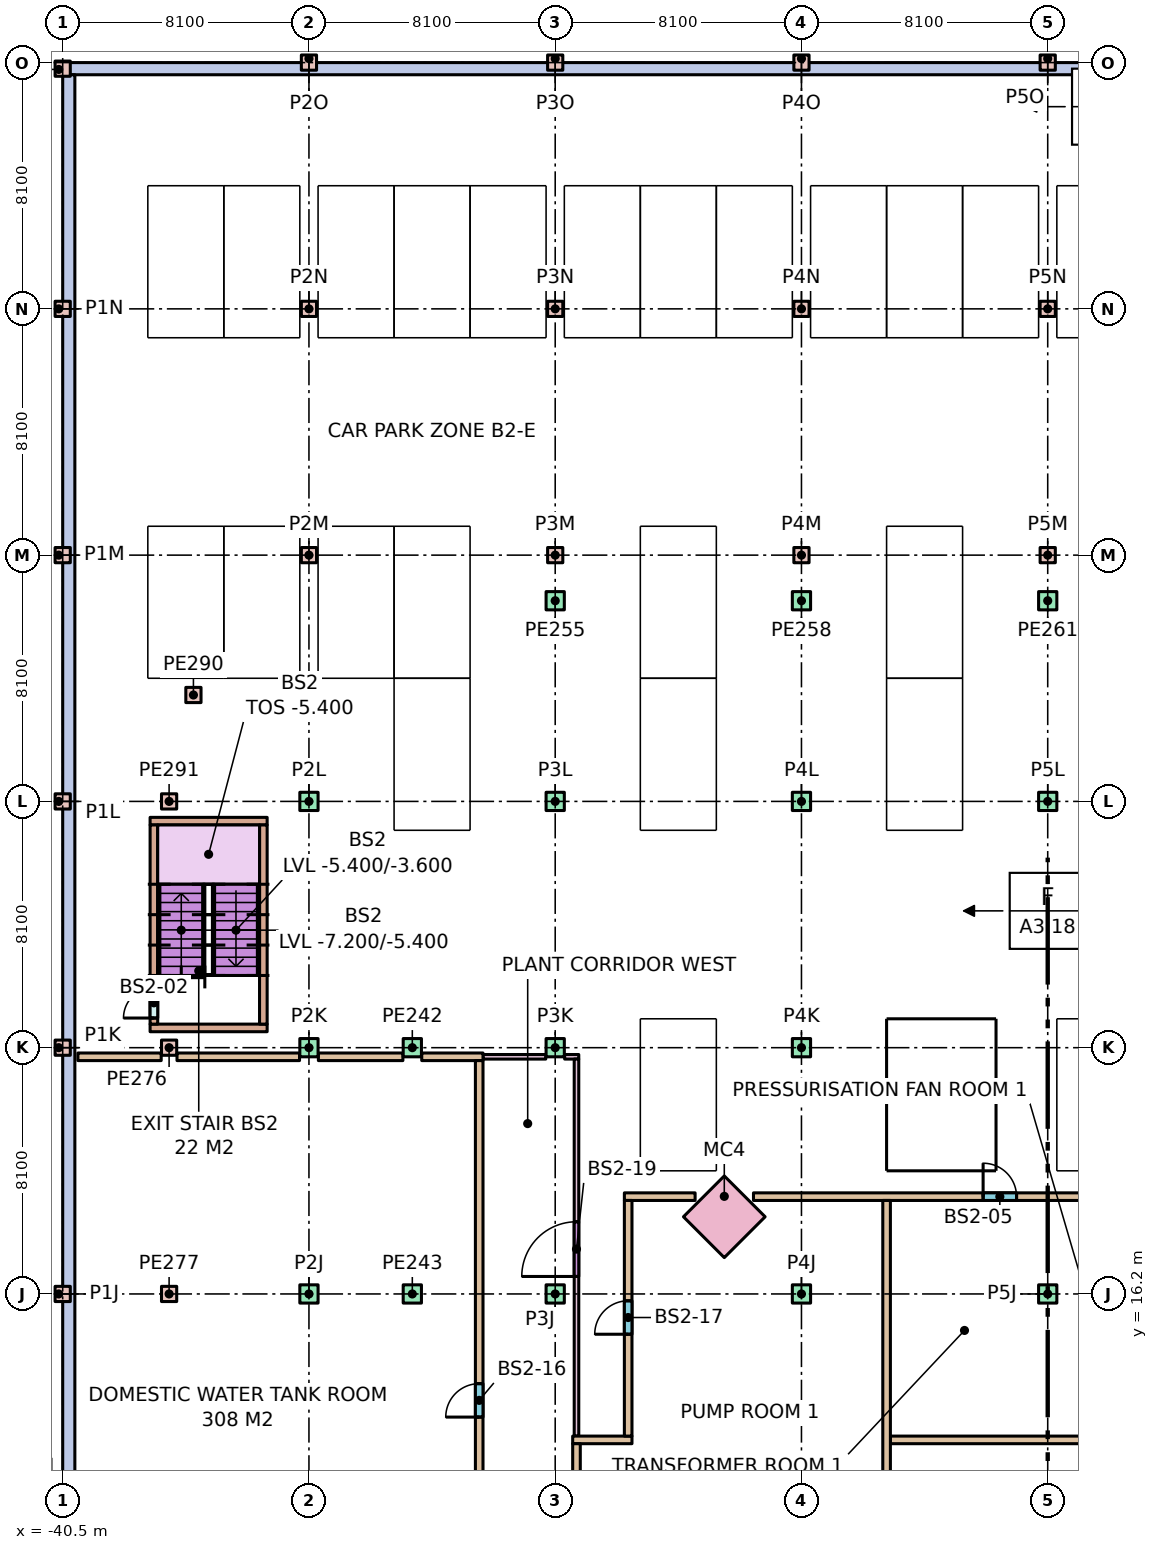
"""IFC4 building model, lengths in metres.
Left out: names, types, materials, properties, quantities, classifications, styles, units other than length and angle.
Written with IfcOpenShell. Run it as: python <this file> out.ifc"""

import sys

from ifc_helpers import new_model, si_unit, direction, frame, frame_2d, origin, origin_2d, place, context, subcontext, project, spatial, rectangle, extrude, element, fill, save


model = new_model("IFC4")
c1 = context("Model", 3, precision=1e-05, world=origin(), true_north=direction((0.0, 1.0)))
c2 = subcontext(c1, "Body", "Model", "MODEL_VIEW")
j1 = project(units=[si_unit("LENGTHUNIT", "METRE"), si_unit("PLANEANGLEUNIT", "RADIAN")], contexts=[c1])
p1 = place(None, origin())
s1 = spatial("IfcSite", under=j1, at=p1, CompositionType="ELEMENT")
p2 = place(p1, origin())
s2 = spatial("IfcBuilding", under=s1, at=p2, CompositionType="ELEMENT")
p3 = place(p2, frame((0.0, 0.0, -7.2)))
s3 = spatial("IfcBuildingStorey", under=s2, at=p3, CompositionType="ELEMENT", Elevation=-7.2)
p4 = place(p3, frame((-40.5, 56.5, 0.0), z_axis=(0.0, 0.0, 1.0), x_axis=(1.0, 0.0, 0.0)))
e1 = element("IfcWall", 1, at=p4, inside=s3, PredefinedType="SOLIDWALL", context=c2, shape_type="SweptSolid", body=[
    extrude(rectangle(XDim=129.6, YDim=0.4, at=frame_2d((64.8, 0.0))), origin(), (0.0, 0.0, 1.0), 3.6),
])
p5 = place(p3, frame((-40.3, -56.3, 0.0), z_axis=(0.0, 0.0, 1.0), x_axis=(0.0, 1.0, 0.0)))
e2 = element("IfcWall", 2, at=p5, inside=s3, PredefinedType="SOLIDWALL", context=c2, shape_type="SweptSolid", body=[
    extrude(rectangle(XDim=112.6, YDim=0.4, at=frame_2d((56.3, 0.0))), origin(), (0.0, 0.0, 1.0), 3.6),
])
for number, where, z_axis, x_axis in (
    (3, (-40.5, 16.2, 0.0), (0.0, 0.0, 1.0), (1.0, 0.0, 0.0)),
    (4, (-40.5, 24.3, 0.0), (0.0, 0.0, 1.0), (1.0, 0.0, 0.0)),
    (5, (-40.5, 32.4, 0.0), (0.0, 0.0, 1.0), (1.0, 0.0, 0.0)),
    (6, (-40.5, 40.5, 0.0), (0.0, 0.0, 1.0), (1.0, 0.0, 0.0)),
    (7, (-40.5, 48.6, 0.0), (0.0, 0.0, 1.0), (1.0, 0.0, 0.0)),
    (8, (-40.5, 56.5, 0.0), (0.0, 0.0, 1.0), (1.0, 0.0, 0.0)),
):
    element("IfcColumn", number, at=place(p3, frame(where, z_axis=z_axis, x_axis=x_axis)), inside=s3, PredefinedType="COLUMN", context=c2, shape_type="SweptSolid", body=[
        extrude(rectangle(XDim=0.5, YDim=0.5, at=origin_2d()), origin(), (0.0, 0.0, 1.0), 3.6),
    ])
for number, where, z_axis, x_axis in (
    (9, (-32.4, 16.2, 0.0), (0.0, 0.0, 1.0), (1.0, 0.0, 0.0)),
    (10, (-32.4, 24.3, 0.0), (0.0, 0.0, 1.0), (1.0, 0.0, 0.0)),
    (11, (-32.4, 32.4, 0.0), (0.0, 0.0, 1.0), (1.0, 0.0, 0.0)),
):
    element("IfcColumn", number, at=place(p3, frame(where, z_axis=z_axis, x_axis=x_axis)), inside=s3, PredefinedType="COLUMN", context=c2, shape_type="SweptSolid", body=[
        extrude(rectangle(XDim=0.6, YDim=0.6, at=origin_2d()), origin(), (0.0, 0.0, 1.0), 3.6),
    ])
for number, where, z_axis, x_axis in (
    (12, (-32.4, 40.5, 0.0), (0.0, 0.0, 1.0), (1.0, 0.0, 0.0)),
    (13, (-32.4, 48.6, 0.0), (0.0, 0.0, 1.0), (1.0, 0.0, 0.0)),
    (14, (-32.4, 56.7, 0.0), (0.0, 0.0, 1.0), (1.0, 0.0, 0.0)),
):
    element("IfcColumn", number, at=place(p3, frame(where, z_axis=z_axis, x_axis=x_axis)), inside=s3, PredefinedType="COLUMN", context=c2, shape_type="SweptSolid", body=[
        extrude(rectangle(XDim=0.5, YDim=0.5, at=origin_2d()), origin(), (0.0, 0.0, 1.0), 3.6),
    ])
for number, where, z_axis, x_axis in (
    (15, (-24.3, 16.2, 0.0), (0.0, 0.0, 1.0), (1.0, 0.0, 0.0)),
    (16, (-24.3, 24.3, 0.0), (0.0, 0.0, 1.0), (1.0, 0.0, 0.0)),
    (17, (-24.3, 32.4, 0.0), (0.0, 0.0, 1.0), (1.0, 0.0, 0.0)),
):
    element("IfcColumn", number, at=place(p3, frame(where, z_axis=z_axis, x_axis=x_axis)), inside=s3, PredefinedType="COLUMN", context=c2, shape_type="SweptSolid", body=[
        extrude(rectangle(XDim=0.6, YDim=0.6, at=origin_2d()), origin(), (0.0, 0.0, 1.0), 3.6),
    ])
for number, where, z_axis, x_axis in (
    (18, (-24.3, 40.5, 0.0), (0.0, 0.0, 1.0), (1.0, 0.0, 0.0)),
    (19, (-24.3, 48.6, 0.0), (0.0, 0.0, 1.0), (1.0, 0.0, 0.0)),
    (20, (-24.3, 56.7, 0.0), (0.0, 0.0, 1.0), (1.0, 0.0, 0.0)),
):
    element("IfcColumn", number, at=place(p3, frame(where, z_axis=z_axis, x_axis=x_axis)), inside=s3, PredefinedType="COLUMN", context=c2, shape_type="SweptSolid", body=[
        extrude(rectangle(XDim=0.5, YDim=0.5, at=origin_2d()), origin(), (0.0, 0.0, 1.0), 3.6),
    ])
for number, where, z_axis, x_axis in (
    (21, (-16.2, 16.2, 0.0), (0.0, 0.0, 1.0), (1.0, 0.0, 0.0)),
    (22, (-16.2, 24.3, 0.0), (0.0, 0.0, 1.0), (1.0, 0.0, 0.0)),
    (23, (-16.2, 32.4, 0.0), (0.0, 0.0, 1.0), (1.0, 0.0, 0.0)),
):
    element("IfcColumn", number, at=place(p3, frame(where, z_axis=z_axis, x_axis=x_axis)), inside=s3, PredefinedType="COLUMN", context=c2, shape_type="SweptSolid", body=[
        extrude(rectangle(XDim=0.6, YDim=0.6, at=origin_2d()), origin(), (0.0, 0.0, 1.0), 3.6),
    ])
for number, where, z_axis, x_axis in (
    (24, (-16.2, 40.5, 0.0), (0.0, 0.0, 1.0), (1.0, 0.0, 0.0)),
    (25, (-16.2, 48.6, 0.0), (0.0, 0.0, 1.0), (1.0, 0.0, 0.0)),
    (26, (-16.2, 56.7, 0.0), (0.0, 0.0, 1.0), (1.0, 0.0, 0.0)),
):
    element("IfcColumn", number, at=place(p3, frame(where, z_axis=z_axis, x_axis=x_axis)), inside=s3, PredefinedType="COLUMN", context=c2, shape_type="SweptSolid", body=[
        extrude(rectangle(XDim=0.5, YDim=0.5, at=origin_2d()), origin(), (0.0, 0.0, 1.0), 3.6),
    ])
for number, where, z_axis, x_axis in (
    (27, (-8.1, 16.2, 0.0), (0.0, 0.0, 1.0), (1.0, 0.0, 0.0)),
    (28, (-8.1, 32.4, 0.0), (0.0, 0.0, 1.0), (1.0, 0.0, 0.0)),
):
    element("IfcColumn", number, at=place(p3, frame(where, z_axis=z_axis, x_axis=x_axis)), inside=s3, PredefinedType="COLUMN", context=c2, shape_type="SweptSolid", body=[
        extrude(rectangle(XDim=0.6, YDim=0.6, at=origin_2d()), origin(), (0.0, 0.0, 1.0), 3.6),
    ])
for number, where, z_axis, x_axis in (
    (29, (-8.1, 40.5, 0.0), (0.0, 0.0, 1.0), (1.0, 0.0, 0.0)),
    (30, (-8.1, 48.6, 0.0), (0.0, 0.0, 1.0), (1.0, 0.0, 0.0)),
    (31, (-8.1, 56.7, 0.0), (0.0, 0.0, 1.0), (1.0, 0.0, 0.0)),
):
    element("IfcColumn", number, at=place(p3, frame(where, z_axis=z_axis, x_axis=x_axis)), inside=s3, PredefinedType="COLUMN", context=c2, shape_type="SweptSolid", body=[
        extrude(rectangle(XDim=0.5, YDim=0.5, at=origin_2d()), origin(), (0.0, 0.0, 1.0), 3.6),
    ])
for number, where, z_axis, x_axis in (
    (32, (-29.0, 24.3, 0.0), (0.0, 0.0, 1.0), (1.0, 0.0, 0.0)),
    (33, (-29.0, 16.2, 0.0), (0.0, 0.0, 1.0), (1.0, 0.0, 0.0)),
    (34, (-24.3, 39.0, 0.0), (0.0, 0.0, 1.0), (1.0, 0.0, 0.0)),
    (35, (-16.2, 39.0, 0.0), (0.0, 0.0, 1.0), (1.0, 0.0, 0.0)),
    (36, (-8.1, 39.0, 0.0), (0.0, 0.0, 1.0), (1.0, 0.0, 0.0)),
):
    element("IfcColumn", number, at=place(p3, frame(where, z_axis=z_axis, x_axis=x_axis)), inside=s3, PredefinedType="COLUMN", context=c2, shape_type="SweptSolid", body=[
        extrude(rectangle(XDim=0.6, YDim=0.6, at=origin_2d()), origin(), (0.0, 0.0, 1.0), 3.6),
    ])
for number, where, z_axis, x_axis in (
    (37, (-37.0, 24.3, 0.0), (0.0, 0.0, 1.0), (1.0, 0.0, 0.0)),
    (38, (-37.0, 16.2, 0.0), (0.0, 0.0, 1.0), (1.0, 0.0, 0.0)),
    (39, (-36.2, 35.9, 0.0), (0.0, 0.0, 1.0), (1.0, 0.0, 0.0)),
    (40, (-37.0, 32.4, 0.0), (0.0, 0.0, 1.0), (1.0, 0.0, 0.0)),
):
    element("IfcColumn", number, at=place(p3, frame(where, z_axis=z_axis, x_axis=x_axis)), inside=s3, PredefinedType="COLUMN", context=c2, shape_type="SweptSolid", body=[
        extrude(rectangle(XDim=0.5, YDim=0.5, at=origin_2d()), origin(), (0.0, 0.0, 1.0), 3.6),
    ])
p6 = place(p3, frame((-18.738, 18.738, 0.0), z_axis=(0.0, 0.0, 1.0), x_axis=(-0.707106781187, -0.707106781187, 0.0)))
e41 = element("IfcColumn", 41, at=p6, inside=s3, PredefinedType="COLUMN", context=c2, shape_type="SweptSolid", body=[
    extrude(rectangle(XDim=1.9, YDim=1.9, at=origin_2d()), origin(), (0.0, 0.0, 1.0), 3.6),
])
for number, where, z_axis, x_axis in (
    (42, (-37.625, 24.95, 0.0), (0.0, 0.0, 1.0), (1.0, 0.0, 0.0)),
    (43, (-37.625, 31.75, 0.0), (0.0, 0.0, 1.0), (1.0, 0.0, 0.0)),
):
    element("IfcWall", number, at=place(p3, frame(where, z_axis=z_axis, x_axis=x_axis)), inside=s3, PredefinedType="STANDARD", context=c2, shape_type="SweptSolid", body=[
        extrude(rectangle(XDim=3.85, YDim=0.25, at=frame_2d((1.925, 0.0))), origin(), (0.0, 0.0, 1.0), 3.28),
    ])
p7 = place(p3, frame((-37.5, 25.075, 0.0), z_axis=(0.0, 0.0, 1.0), x_axis=(0.0, 1.0, 0.0)))
e44 = element("IfcWall", 44, at=p7, inside=s3, PredefinedType="STANDARD", context=c2, shape_type="SweptSolid", body=[
    extrude(rectangle(XDim=6.55, YDim=0.25, at=frame_2d((3.275, 0.0))), origin(), (0.0, 0.0, 1.0), 3.28),
])
p8 = place(p7, frame((0.2, 0.0, 0.0)))
e45 = element("IfcOpeningElement", 45, at=p8, cuts=e44, PredefinedType="OPENING", context=c2, shape_type="SweptSolid", body=[
    extrude(rectangle(XDim=1.0, YDim=2.1, at=frame_2d((0.5, 1.05))), frame((0.0, 0.135, 0.0), z_axis=(0.0, -1.0, 0.0), x_axis=(1.0, 0.0, 0.0)), (0.0, 0.0, 1.0), 0.27),
])
p9 = place(p3, frame((-33.9, 25.075, 0.0), z_axis=(0.0, 0.0, 1.0), x_axis=(0.0, 1.0, 0.0)))
e46 = element("IfcWall", 46, at=p9, inside=s3, PredefinedType="STANDARD", context=c2, shape_type="SweptSolid", body=[
    extrude(rectangle(XDim=6.55, YDim=0.25, at=frame_2d((3.275, 0.0))), origin(), (0.0, 0.0, 1.0), 3.28),
])
p10 = place(p3, frame((-13.275, 11.4, 0.0), z_axis=(0.0, 0.0, 1.0), x_axis=(1.0, 0.0, 0.0)))
e47 = element("IfcWall", 47, at=p10, inside=s3, PredefinedType="PARTITIONING", context=c2, shape_type="SweptSolid", body=[
    extrude(rectangle(XDim=34.55, YDim=0.25, at=frame_2d((17.275, 0.0))), origin(), (0.0, 0.0, 1.0), 3.28),
])
p11 = place(p3, frame((-26.675, 24.0, 0.0), z_axis=(0.0, 0.0, 1.0), x_axis=(1.0, 0.0, 0.0)))
e48 = element("IfcWall", 48, at=p11, inside=s3, PredefinedType="PARTITIONING", context=c2, shape_type="SweptSolid", body=[
    extrude(rectangle(XDim=2.065, YDim=0.15, at=frame_2d((1.032, 0.0))), origin(), (0.0, 0.0, 1.0), 3.28),
])
p12 = place(p3, frame((-23.99, 24.0, 0.0), z_axis=(0.0, 0.0, 1.0), x_axis=(1.0, 0.0, 0.0)))
e49 = element("IfcWall", 49, at=p12, inside=s3, PredefinedType="PARTITIONING", context=c2, shape_type="SweptSolid", body=[
    extrude(rectangle(XDim=0.465, YDim=0.15, at=frame_2d((0.232, 0.0))), origin(), (0.0, 0.0, 1.0), 3.28),
])
p13 = place(p3, frame((-23.6, 11.525, 0.0), z_axis=(0.0, 0.0, 1.0), x_axis=(0.0, 1.0, 0.0)))
e50 = element("IfcWall", 50, at=p13, inside=s3, PredefinedType="PARTITIONING", context=c2, shape_type="SweptSolid", body=[
    extrude(rectangle(XDim=12.4, YDim=0.15, at=frame_2d((6.2, 0.0))), origin(), (0.0, 0.0, 1.0), 3.28),
])
p14 = place(p13, frame((5.25, 0.0, 0.0)))
e51 = element("IfcOpeningElement", 51, at=p14, cuts=e50, PredefinedType="OPENING", context=c2, shape_type="SweptSolid", body=[
    extrude(rectangle(XDim=1.8, YDim=2.4, at=frame_2d((0.9, 1.2))), frame((0.0, 0.085, 0.0), z_axis=(0.0, -1.0, 0.0), x_axis=(1.0, 0.0, 0.0)), (0.0, 0.0, 1.0), 0.17),
])
p15 = place(p3, frame((-40.0, 24.0, 0.0), z_axis=(0.0, 0.0, 1.0), x_axis=(1.0, 0.0, 0.0)))
e52 = element("IfcWall", 52, at=p15, inside=s3, PredefinedType="PARTITIONING", context=c2, shape_type="SweptSolid", body=[
    extrude(rectangle(XDim=2.74, YDim=0.25, at=frame_2d((1.37, 0.0))), origin(), (0.0, 0.0, 1.0), 3.28),
])
p16 = place(p3, frame((-36.74, 24.0, 0.0), z_axis=(0.0, 0.0, 1.0), x_axis=(1.0, 0.0, 0.0)))
e53 = element("IfcWall", 53, at=p16, inside=s3, PredefinedType="PARTITIONING", context=c2, shape_type="SweptSolid", body=[
    extrude(rectangle(XDim=4.03, YDim=0.25, at=frame_2d((2.015, 0.0))), origin(), (0.0, 0.0, 1.0), 3.28),
])
p17 = place(p3, frame((-32.09, 24.0, 0.0), z_axis=(0.0, 0.0, 1.0), x_axis=(1.0, 0.0, 0.0)))
e54 = element("IfcWall", 54, at=p17, inside=s3, PredefinedType="PARTITIONING", context=c2, shape_type="SweptSolid", body=[
    extrude(rectangle(XDim=2.78, YDim=0.25, at=frame_2d((1.39, 0.0))), origin(), (0.0, 0.0, 1.0), 3.28),
])
p18 = place(p3, frame((-28.69, 24.0, 0.0), z_axis=(0.0, 0.0, 1.0), x_axis=(1.0, 0.0, 0.0)))
e55 = element("IfcWall", 55, at=p18, inside=s3, PredefinedType="PARTITIONING", context=c2, shape_type="SweptSolid", body=[
    extrude(rectangle(XDim=2.015, YDim=0.25, at=frame_2d((1.007, 0.0))), origin(), (0.0, 0.0, 1.0), 3.28),
])
p19 = place(p3, frame((-23.725, 11.4, 0.0), z_axis=(0.0, 0.0, 1.0), x_axis=(1.0, 0.0, 0.0)))
e56 = element("IfcWall", 56, at=p19, inside=s3, PredefinedType="PARTITIONING", context=c2, shape_type="SweptSolid", body=[
    extrude(rectangle(XDim=1.95, YDim=0.25, at=frame_2d((0.975, 0.0))), origin(), (0.0, 0.0, 1.0), 3.28),
])
p20 = place(p3, frame((-22.025, 19.4, 0.0), z_axis=(0.0, 0.0, 1.0), x_axis=(1.0, 0.0, 0.0)))
e57 = element("IfcWall", 57, at=p20, inside=s3, PredefinedType="PARTITIONING", context=c2, shape_type="SweptSolid", body=[
    extrude(rectangle(XDim=2.327, YDim=0.25, at=frame_2d((1.163, 0.0))), origin(), (0.0, 0.0, 1.0), 3.28),
])
p21 = place(p3, frame((-17.778, 19.4, 0.0), z_axis=(0.0, 0.0, 1.0), x_axis=(1.0, 0.0, 0.0)))
e58 = element("IfcWall", 58, at=p21, inside=s3, PredefinedType="PARTITIONING", context=c2, shape_type="SweptSolid", body=[
    extrude(rectangle(XDim=35.557, YDim=0.25, at=frame_2d((17.778, 0.0))), origin(), (0.0, 0.0, 1.0), 3.28),
])
p22 = place(p21, frame((7.553, 0.0, 0.0)))
e59 = element("IfcOpeningElement", 59, at=p22, cuts=e58, PredefinedType="OPENING", context=c2, shape_type="SweptSolid", body=[
    extrude(rectangle(XDim=1.1, YDim=2.1, at=frame_2d((0.55, 1.05))), frame((0.0, 0.135, 0.0), z_axis=(0.0, -1.0, 0.0), x_axis=(1.0, 0.0, 0.0)), (0.0, 0.0, 1.0), 0.27),
])
p23 = place(p21, frame((14.7, 0.0, 0.0)))
e60 = element("IfcOpeningElement", 60, at=p23, cuts=e58, PredefinedType="OPENING", context=c2, shape_type="SweptSolid", body=[
    extrude(rectangle(XDim=1.1, YDim=2.1, at=frame_2d((0.55, 1.05))), frame((0.0, 0.135, 0.0), z_axis=(0.0, -1.0, 0.0), x_axis=(1.0, 0.0, 0.0)), (0.0, 0.0, 1.0), 0.27),
])
p24 = place(p21, frame((21.847, 0.0, 0.0)))
e61 = element("IfcOpeningElement", 61, at=p24, cuts=e58, PredefinedType="OPENING", context=c2, shape_type="SweptSolid", body=[
    extrude(rectangle(XDim=1.1, YDim=2.1, at=frame_2d((0.55, 1.05))), frame((0.0, 0.135, 0.0), z_axis=(0.0, -1.0, 0.0), x_axis=(1.0, 0.0, 0.0)), (0.0, 0.0, 1.0), 0.27),
])
p25 = place(p21, frame((30.193, 0.0, 0.0)))
e62 = element("IfcOpeningElement", 62, at=p25, cuts=e58, PredefinedType="OPENING", context=c2, shape_type="SweptSolid", body=[
    extrude(rectangle(XDim=1.1, YDim=2.1, at=frame_2d((0.55, 1.05))), frame((0.0, 0.135, 0.0), z_axis=(0.0, -1.0, 0.0), x_axis=(1.0, 0.0, 0.0)), (0.0, 0.0, 1.0), 0.27),
])
p26 = place(p3, frame((-21.9, 11.525, 0.0), z_axis=(0.0, 0.0, 1.0), x_axis=(0.0, 1.0, 0.0)))
e63 = element("IfcWall", 63, at=p26, inside=s3, PredefinedType="PARTITIONING", context=c2, shape_type="SweptSolid", body=[
    extrude(rectangle(XDim=7.75, YDim=0.25, at=frame_2d((3.875, 0.0))), origin(), (0.0, 0.0, 1.0), 3.28),
])
p27 = place(p26, frame((3.35, 0.0, 0.0)))
e64 = element("IfcOpeningElement", 64, at=p27, cuts=e63, PredefinedType="OPENING", context=c2, shape_type="SweptSolid", body=[
    extrude(rectangle(XDim=1.1, YDim=2.1, at=frame_2d((0.55, 1.05))), frame((0.0, 0.135, 0.0), z_axis=(0.0, -1.0, 0.0), x_axis=(1.0, 0.0, 0.0)), (0.0, 0.0, 1.0), 0.27),
])
p28 = place(p3, frame((-26.8, 0.96, 0.0), z_axis=(0.0, 0.0, 1.0), x_axis=(0.0, 1.0, 0.0)))
e65 = element("IfcWall", 65, at=p28, inside=s3, PredefinedType="PARTITIONING", context=c2, shape_type="SweptSolid", body=[
    extrude(rectangle(XDim=22.915, YDim=0.25, at=frame_2d((11.458, 0.0))), origin(), (0.0, 0.0, 1.0), 3.28),
])
p29 = place(p28, frame((11.19, 0.0, 0.0)))
e66 = element("IfcOpeningElement", 66, at=p29, cuts=e65, PredefinedType="OPENING", context=c2, shape_type="SweptSolid", body=[
    extrude(rectangle(XDim=1.1, YDim=2.1, at=frame_2d((0.55, 1.05))), frame((0.0, 0.135, 0.0), z_axis=(0.0, -1.0, 0.0), x_axis=(1.0, 0.0, 0.0)), (0.0, 0.0, 1.0), 0.27),
])
p30 = place(p3, frame((-23.6, 1.725, 0.0), z_axis=(0.0, 0.0, 1.0), x_axis=(0.0, 1.0, 0.0)))
e67 = element("IfcWall", 67, at=p30, inside=s3, PredefinedType="PARTITIONING", context=c2, shape_type="SweptSolid", body=[
    extrude(rectangle(XDim=9.55, YDim=0.25, at=frame_2d((4.775, 0.0))), origin(), (0.0, 0.0, 1.0), 3.28),
])
p31 = place(p3, frame((-13.4, 1.725, 0.0), z_axis=(0.0, 0.0, 1.0), x_axis=(0.0, 1.0, 0.0)))
e68 = element("IfcWall", 68, at=p31, inside=s3, PredefinedType="PARTITIONING", context=c2, shape_type="SweptSolid", body=[
    extrude(rectangle(XDim=17.55, YDim=0.25, at=frame_2d((8.775, 0.0))), origin(), (0.0, 0.0, 1.0), 3.28),
])
p32 = place(p8, origin())
e69 = element("IfcDoor", 69, at=p32, inside=s3, OperationType="SINGLE_SWING_LEFT", PredefinedType="DOOR", context=c2, shape_type="SweptSolid", body=[
    extrude(rectangle(XDim=1.0, YDim=2.1, at=frame_2d((0.5, 1.05))), frame((0.0, 0.025, 0.0), z_axis=(0.0, -1.0, 0.0), x_axis=(1.0, 0.0, 0.0)), (0.0, 0.0, 1.0), 0.05),
])
fill(e45, e69)
p33 = place(p22, origin())
e70 = element("IfcDoor", 70, at=p33, inside=s3, OperationType="SINGLE_SWING_LEFT", PredefinedType="DOOR", context=c2, shape_type="SweptSolid", body=[
    extrude(rectangle(XDim=1.1, YDim=2.1, at=frame_2d((0.55, 1.05))), frame((0.0, 0.025, 0.0), z_axis=(0.0, -1.0, 0.0), x_axis=(1.0, 0.0, 0.0)), (0.0, 0.0, 1.0), 0.05),
])
fill(e59, e70)
p34 = place(p29, origin())
e71 = element("IfcDoor", 71, at=p34, inside=s3, OperationType="SINGLE_SWING_LEFT", PredefinedType="DOOR", context=c2, shape_type="SweptSolid", body=[
    extrude(rectangle(XDim=1.1, YDim=2.1, at=frame_2d((0.55, 1.05))), frame((0.0, 0.025, 0.0), z_axis=(0.0, -1.0, 0.0), x_axis=(1.0, 0.0, 0.0)), (0.0, 0.0, 1.0), 0.05),
])
fill(e66, e71)
p35 = place(p27, origin())
e72 = element("IfcDoor", 72, at=p35, inside=s3, OperationType="SINGLE_SWING_LEFT", PredefinedType="DOOR", context=c2, shape_type="SweptSolid", body=[
    extrude(rectangle(XDim=1.1, YDim=2.1, at=frame_2d((0.55, 1.05))), frame((0.0, 0.025, 0.0), z_axis=(0.0, -1.0, 0.0), x_axis=(1.0, 0.0, 0.0)), (0.0, 0.0, 1.0), 0.05),
])
fill(e64, e72)
p36 = place(p14, origin())
e73 = element("IfcDoor", 73, at=p36, inside=s3, OperationType="SINGLE_SWING_LEFT", PredefinedType="DOOR", context=c2, shape_type="SweptSolid", body=[
    extrude(rectangle(XDim=1.8, YDim=2.4, at=frame_2d((0.9, 1.2))), frame((0.0, 0.025, 0.0), z_axis=(0.0, -1.0, 0.0), x_axis=(1.0, 0.0, 0.0)), (0.0, 0.0, 1.0), 0.05),
])
fill(e51, e73)
save(model, sys.argv[1])
